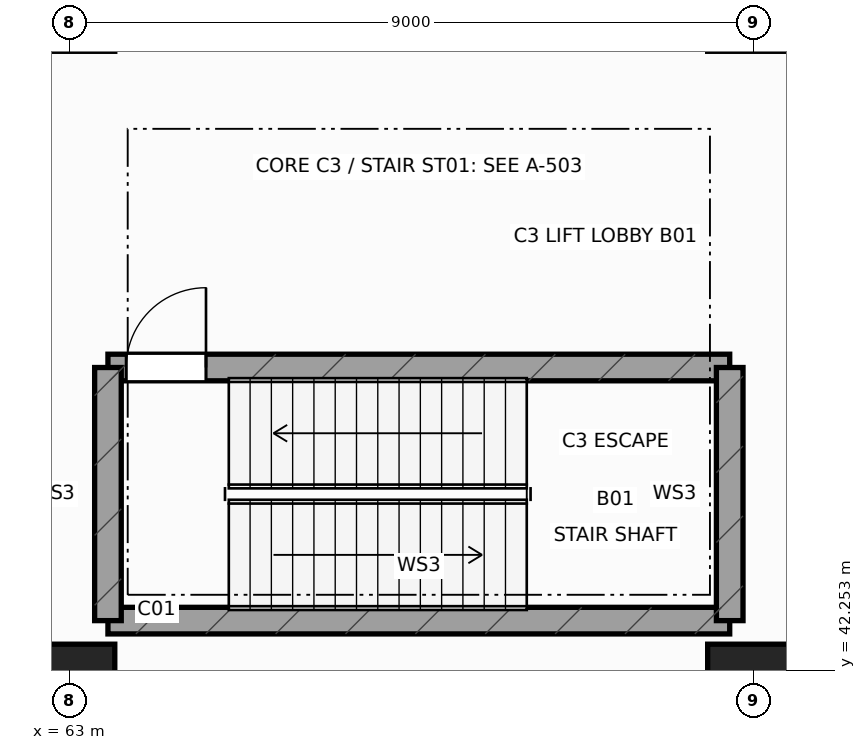
"""IFC4 building model, lengths in metres.
Left out: names, types, materials, properties, quantities, classifications, styles, units other than length and angle.
Written with IfcOpenShell. Run it as: python <this file> out.ifc"""

import sys

from ifc_helpers import new_model, si_unit, direction, frame, frame_2d, origin, origin_2d, place, context, subcontext, project, spatial, rectangle, extrude, element, fill, save


model = new_model("IFC4")
c1 = context("Model", 3, precision=1e-05, world=origin(), true_north=direction((0.0, 1.0)))
c2 = subcontext(c1, "Body", "Model", "MODEL_VIEW")
j1 = project(units=[si_unit("LENGTHUNIT", "METRE"), si_unit("PLANEANGLEUNIT", "RADIAN")], contexts=[c1])
p1 = place(None, origin())
s1 = spatial("IfcSite", under=j1, at=p1, CompositionType="ELEMENT")
p2 = place(p1, origin())
s2 = spatial("IfcBuilding", under=s1, at=p2, CompositionType="ELEMENT")
p3 = place(p2, frame((0.0, 0.0, -5.4)))
s3 = spatial("IfcBuildingStorey", under=s2, at=p3, CompositionType="ELEMENT", Elevation=-5.4)
for number, where, z_axis, x_axis in (
    (1, (63.0, 42.0, 0.0), (0.0, 0.0, 1.0), (1.0, 0.0, 0.0)),
    (2, (72.0, 42.0, 0.0), (0.0, 0.0, 1.0), (1.0, 0.0, 0.0)),
):
    element("IfcColumn", number, at=place(p3, frame(where, z_axis=z_axis, x_axis=x_axis)), inside=s3, PredefinedType="COLUMN", context=c2, shape_type="SweptSolid", body=[
        extrude(rectangle(XDim=1.2, YDim=1.2, at=origin_2d()), origin(), (0.0, 0.0, 1.0), 5.4),
    ])
p4 = place(p3, frame((63.51, 42.91, 0.0), z_axis=(0.0, 0.0, 1.0), x_axis=(1.0, 0.0, 0.0)))
e3 = element("IfcWall", 3, at=p4, inside=s3, PredefinedType="SHEAR", context=c2, shape_type="SweptSolid", body=[
    extrude(rectangle(XDim=8.18, YDim=0.35, at=frame_2d((4.09, 0.0))), origin(), (0.0, 0.0, 1.0), 5.08),
])
p5 = place(p3, frame((63.51, 46.24, 0.0), z_axis=(0.0, 0.0, 1.0), x_axis=(1.0, 0.0, 0.0)))
e4 = element("IfcWall", 4, at=p5, inside=s3, PredefinedType="SHEAR", context=c2, shape_type="SweptSolid", body=[
    extrude(rectangle(XDim=8.18, YDim=0.35, at=frame_2d((4.09, 0.0))), origin(), (0.0, 0.0, 1.0), 5.08),
])
p6 = place(p5, frame((0.24, 0.0, 0.0)))
e5 = element("IfcOpeningElement", 5, at=p6, cuts=e4, PredefinedType="OPENING", context=c2, shape_type="SweptSolid", body=[
    extrude(rectangle(XDim=1.05, YDim=2.18, at=frame_2d((0.525, 1.09))), frame((0.0, 0.185, 0.0), z_axis=(0.0, -1.0, 0.0), x_axis=(1.0, 0.0, 0.0)), (0.0, 0.0, 1.0), 0.37),
])
for number, where, z_axis, x_axis in (
    (6, (63.51, 42.91, 0.0), (0.0, 0.0, 1.0), (0.0, 1.0, 0.0)),
    (7, (71.69, 42.91, 0.0), (0.0, 0.0, 1.0), (0.0, 1.0, 0.0)),
):
    element("IfcWall", number, at=place(p3, frame(where, z_axis=z_axis, x_axis=x_axis)), inside=s3, PredefinedType="SHEAR", context=c2, shape_type="SweptSolid", body=[
        extrude(rectangle(XDim=3.33, YDim=0.35, at=frame_2d((1.665, 0.0))), origin(), (0.0, 0.0, 1.0), 5.08),
    ])
p7 = place(p6, origin())
e8 = element("IfcDoor", 8, at=p7, inside=s3, OperationType="SINGLE_SWING_RIGHT", PredefinedType="DOOR", context=c2, shape_type="SweptSolid", body=[
    extrude(rectangle(XDim=1.05, YDim=2.18, at=frame_2d((0.525, 1.09))), frame((0.0, 0.025, 0.0), z_axis=(0.0, -1.0, 0.0), x_axis=(1.0, 0.0, 0.0)), (0.0, 0.0, 1.0), 0.05),
])
fill(e5, e8)
save(model, sys.argv[1])
